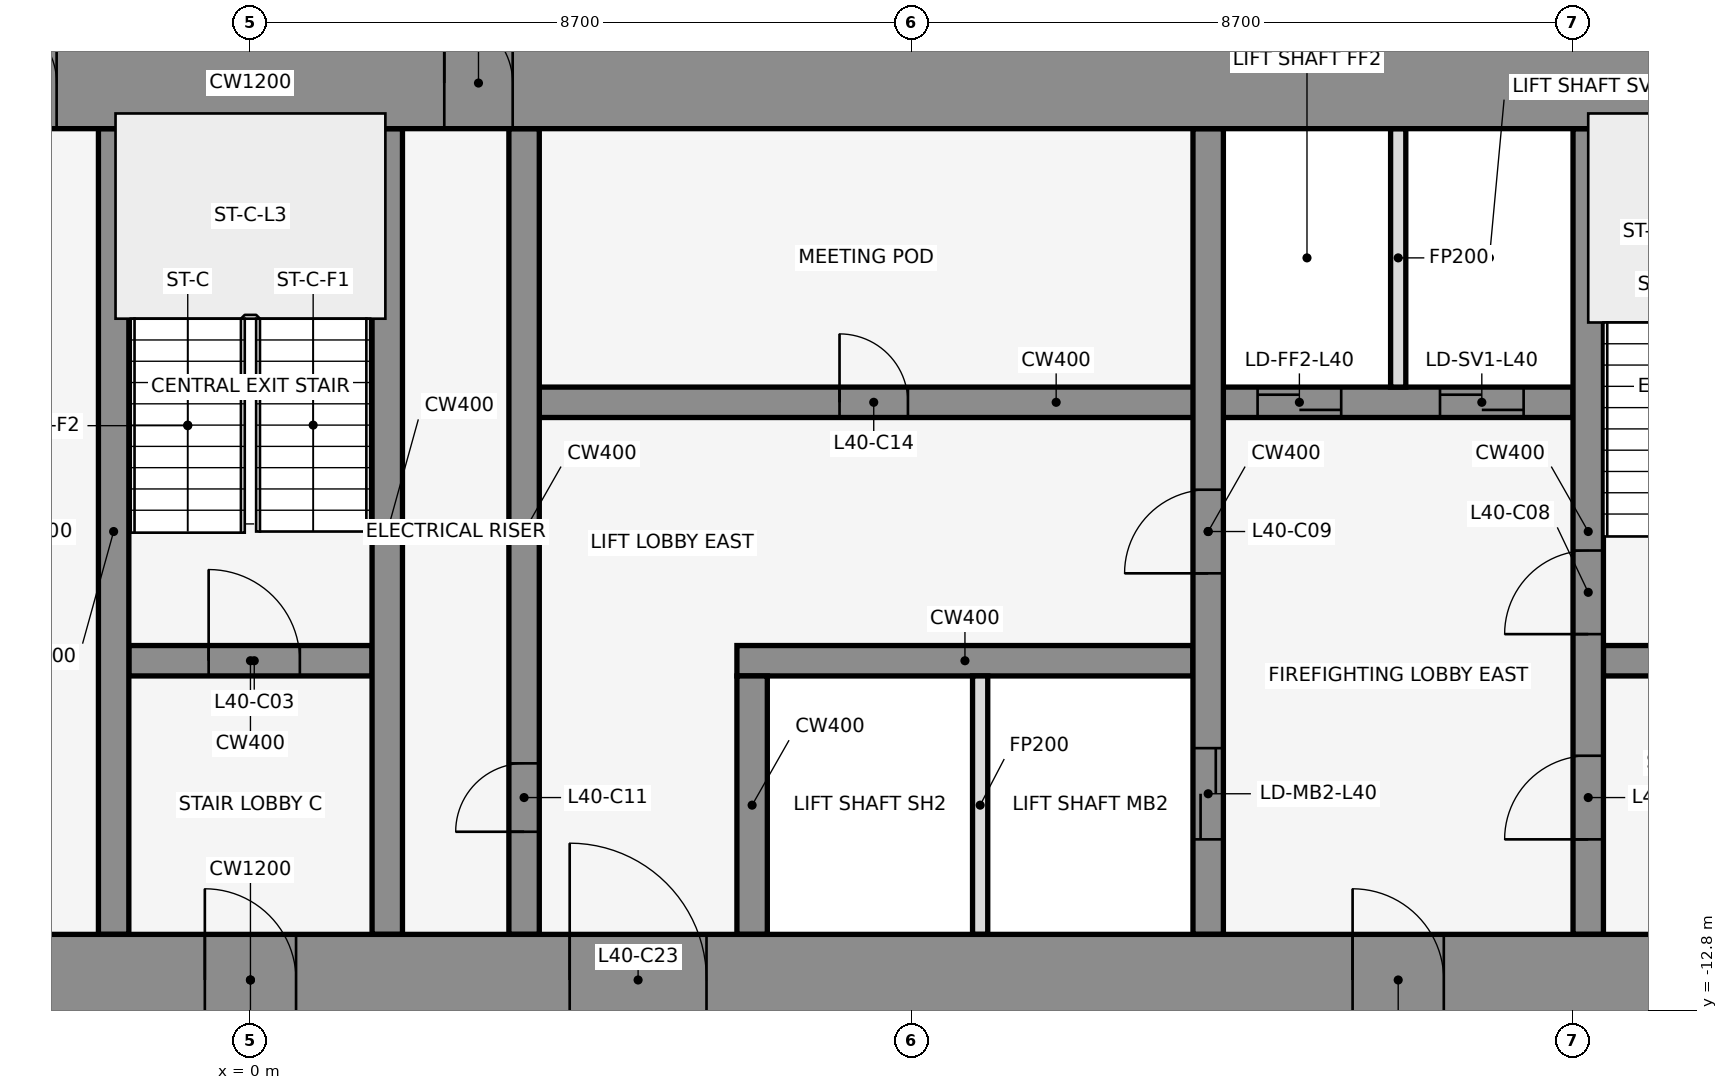
"""IFC4 building model, lengths in metres.
Left out: names, types, materials, properties, quantities, classifications, styles, units other than length and angle.
Written with IfcOpenShell. Run it as: python <this file> out.ifc"""

import sys

from ifc_helpers import new_model, si_unit, direction, frame, frame_2d, origin, place, context, subcontext, project, spatial, rectangle, extrude, element, fill, save


model = new_model("IFC4")
c1 = context("Model", 3, precision=1e-05, world=origin(), true_north=direction((0.0, 1.0)))
c2 = subcontext(c1, "Body", "Model", "MODEL_VIEW")
j1 = project(units=[si_unit("LENGTHUNIT", "METRE"), si_unit("PLANEANGLEUNIT", "RADIAN")], contexts=[c1])
p1 = place(None, origin())
s1 = spatial("IfcSite", under=j1, at=p1, CompositionType="ELEMENT")
p2 = place(p1, origin())
s2 = spatial("IfcBuilding", under=s1, at=p2, CompositionType="ELEMENT")
p3 = place(p2, frame((0.0, 0.0, 181.4)))
s3 = spatial("IfcBuildingStorey", under=s2, at=p3, CompositionType="ELEMENT", Elevation=181.4)
for number, where, z_axis, x_axis in (
    (1, (16.432, -0.105, 0.0), (0.0, 0.0, 1.0), (-0.84, 0.543, 0.0)),
    (2, (1.901, 1.08, 0.0), (0.0, 0.0, 1.0), (-0.84, -0.543, 0.0)),
    (3, (-0.068, -0.105, 0.0), (0.0, 0.0, 1.0), (-0.84, 0.543, 0.0)),
):
    element("IfcWall", number, at=place(p3, frame(where, z_axis=z_axis, x_axis=x_axis)), inside=s3, PredefinedType="STANDARD", context=c2, shape_type="SweptSolid", body=[
        extrude(rectangle(XDim=2.183, YDim=0.25, at=frame_2d((1.091, 0.0))), origin(), (0.0, 0.0, 1.0), 3.9),
    ])
p4 = place(p3, frame((-1.6, -8.2, 0.0), z_axis=(0.0, 0.0, 1.0), x_axis=(1.0, 0.0, 0.0)))
e4 = element("IfcWall", 4, at=p4, inside=s3, PredefinedType="SHEAR", context=c2, shape_type="SweptSolid", body=[
    extrude(rectangle(XDim=3.2, YDim=0.4, at=frame_2d((1.6, 0.0))), origin(), (0.0, 0.0, 1.0), 4.1),
])
p5 = place(p4, frame((1.05, 0.0, 0.0)))
e5 = element("IfcOpeningElement", 5, at=p5, cuts=e4, PredefinedType="OPENING", context=c2, shape_type="SweptSolid", body=[
    extrude(rectangle(XDim=1.2, YDim=2.1, at=frame_2d((0.6, 1.05))), frame((0.0, 0.212, 0.0), z_axis=(0.0, -1.0, 0.0), x_axis=(1.0, 0.0, 0.0)), (0.0, 0.0, 1.0), 0.424),
])
p6 = place(p3, frame((6.4, -8.2, 0.0), z_axis=(0.0, 0.0, 1.0), x_axis=(1.0, 0.0, 0.0)))
e6 = element("IfcWall", 6, at=p6, inside=s3, PredefinedType="SHEAR", context=c2, shape_type="SweptSolid", body=[
    extrude(rectangle(XDim=6.0, YDim=0.4, at=frame_2d((3.0, 0.0))), origin(), (0.0, 0.0, 1.0), 4.1),
])
p7 = place(p3, frame((17.8, -8.2, 0.0), z_axis=(0.0, 0.0, 1.0), x_axis=(1.0, 0.0, 0.0)))
e7 = element("IfcWall", 7, at=p7, inside=s3, PredefinedType="SHEAR", context=c2, shape_type="SweptSolid", body=[
    extrude(rectangle(XDim=3.0, YDim=0.4, at=frame_2d((1.5, 0.0))), origin(), (0.0, 0.0, 1.0), 4.1),
])
p8 = place(p7, frame((0.85, 0.0, 0.0)))
e8 = element("IfcOpeningElement", 8, at=p8, cuts=e7, PredefinedType="OPENING", context=c2, shape_type="SweptSolid", body=[
    extrude(rectangle(XDim=1.2, YDim=2.1, at=frame_2d((0.6, 1.05))), frame((0.0, 0.212, 0.0), z_axis=(0.0, -1.0, 0.0), x_axis=(1.0, 0.0, 0.0)), (0.0, 0.0, 1.0), 0.424),
])
p9 = place(p3, frame((3.8, -4.8, 0.0), z_axis=(0.0, 0.0, 1.0), x_axis=(1.0, 0.0, 0.0)))
e9 = element("IfcWall", 9, at=p9, inside=s3, PredefinedType="SHEAR", context=c2, shape_type="SweptSolid", body=[
    extrude(rectangle(XDim=13.6, YDim=0.4, at=frame_2d((6.8, 0.0))), origin(), (0.0, 0.0, 1.0), 4.1),
])
p10 = place(p9, frame((9.45, 0.0, 0.0)))
e10 = element("IfcOpeningElement", 10, at=p10, cuts=e9, PredefinedType="OPENING", context=c2, shape_type="SweptSolid", body=[
    extrude(rectangle(XDim=1.1, YDim=2.1, at=frame_2d((0.55, 1.05))), frame((0.0, 0.212, 0.0), z_axis=(0.0, -1.0, 0.0), x_axis=(1.0, 0.0, 0.0)), (0.0, 0.0, 1.0), 0.424),
])
p11 = place(p9, frame((11.85, 0.0, 0.0)))
e11 = element("IfcOpeningElement", 11, at=p11, cuts=e9, PredefinedType="OPENING", context=c2, shape_type="SweptSolid", body=[
    extrude(rectangle(XDim=1.1, YDim=2.1, at=frame_2d((0.55, 1.05))), frame((0.0, 0.212, 0.0), z_axis=(0.0, -1.0, 0.0), x_axis=(1.0, 0.0, 0.0)), (0.0, 0.0, 1.0), 0.424),
])
p12 = place(p9, frame((3.95, 0.0, 0.0)))
e12 = element("IfcOpeningElement", 12, at=p12, cuts=e9, PredefinedType="OPENING", context=c2, shape_type="SweptSolid", body=[
    extrude(rectangle(XDim=0.9, YDim=2.1, at=frame_2d((0.45, 1.05))), frame((0.0, 0.212, 0.0), z_axis=(0.0, -1.0, 0.0), x_axis=(1.0, 0.0, 0.0)), (0.0, 0.0, 1.0), 0.424),
])
for number, where, z_axis, x_axis in (
    (13, (-1.8, -11.8, 0.0), (0.0, 0.0, 1.0), (0.0, 1.0, 0.0)),
    (14, (1.8, -11.8, 0.0), (0.0, 0.0, 1.0), (0.0, 1.0, 0.0)),
):
    element("IfcWall", number, at=place(p3, frame(where, z_axis=z_axis, x_axis=x_axis)), inside=s3, PredefinedType="SHEAR", context=c2, shape_type="SweptSolid", body=[
        extrude(rectangle(XDim=10.6, YDim=0.4, at=frame_2d((5.3, 0.0))), origin(), (0.0, 0.0, 1.0), 4.1),
    ])
p13 = place(p3, frame((3.6, -11.8, 0.0), z_axis=(0.0, 0.0, 1.0), x_axis=(0.0, 1.0, 0.0)))
e15 = element("IfcWall", 15, at=p13, inside=s3, PredefinedType="SHEAR", context=c2, shape_type="SweptSolid", body=[
    extrude(rectangle(XDim=10.6, YDim=0.4, at=frame_2d((5.3, 0.0))), origin(), (0.0, 0.0, 1.0), 4.1),
])
p14 = place(p13, frame((1.35, 0.0, 0.0)))
e16 = element("IfcOpeningElement", 16, at=p14, cuts=e15, PredefinedType="OPENING", context=c2, shape_type="SweptSolid", body=[
    extrude(rectangle(XDim=0.9, YDim=2.1, at=frame_2d((0.45, 1.05))), frame((0.0, 0.212, 0.0), z_axis=(0.0, -1.0, 0.0), x_axis=(1.0, 0.0, 0.0)), (0.0, 0.0, 1.0), 0.424),
])
p15 = place(p3, frame((6.6, -11.8, 0.0), z_axis=(0.0, 0.0, 1.0), x_axis=(0.0, 1.0, 0.0)))
e17 = element("IfcWall", 17, at=p15, inside=s3, PredefinedType="SHEAR", context=c2, shape_type="SweptSolid", body=[
    extrude(rectangle(XDim=3.4, YDim=0.4, at=frame_2d((1.7, 0.0))), origin(), (0.0, 0.0, 1.0), 4.1),
])
p16 = place(p3, frame((9.6, -11.8, 0.0), z_axis=(0.0, 0.0, 1.0), x_axis=(0.0, 1.0, 0.0)))
e18 = element("IfcWall", 18, at=p16, inside=s3, PredefinedType="PARTITIONING", context=c2, shape_type="SweptSolid", body=[
    extrude(rectangle(XDim=3.4, YDim=0.2, at=frame_2d((1.7, 0.0))), origin(), (0.0, 0.0, 1.0), 2.79),
])
p17 = place(p3, frame((12.6, -11.8, 0.0), z_axis=(0.0, 0.0, 1.0), x_axis=(0.0, 1.0, 0.0)))
e19 = element("IfcWall", 19, at=p17, inside=s3, PredefinedType="SHEAR", context=c2, shape_type="SweptSolid", body=[
    extrude(rectangle(XDim=10.6, YDim=0.4, at=frame_2d((5.3, 0.0))), origin(), (0.0, 0.0, 1.0), 4.1),
])
p18 = place(p17, frame((1.25, 0.0, 0.0)))
e20 = element("IfcOpeningElement", 20, at=p18, cuts=e19, PredefinedType="OPENING", context=c2, shape_type="SweptSolid", body=[
    extrude(rectangle(XDim=1.2, YDim=2.1, at=frame_2d((0.6, 1.05))), frame((0.0, 0.212, 0.0), z_axis=(0.0, -1.0, 0.0), x_axis=(1.0, 0.0, 0.0)), (0.0, 0.0, 1.0), 0.424),
])
p19 = place(p17, frame((4.75, 0.0, 0.0)))
e21 = element("IfcOpeningElement", 21, at=p19, cuts=e19, PredefinedType="OPENING", context=c2, shape_type="SweptSolid", body=[
    extrude(rectangle(XDim=1.1, YDim=2.1, at=frame_2d((0.55, 1.05))), frame((0.0, 0.212, 0.0), z_axis=(0.0, -1.0, 0.0), x_axis=(1.0, 0.0, 0.0)), (0.0, 0.0, 1.0), 0.424),
])
p20 = place(p3, frame((15.1, -4.6, 0.0), z_axis=(0.0, 0.0, 1.0), x_axis=(0.0, 1.0, 0.0)))
e22 = element("IfcWall", 22, at=p20, inside=s3, PredefinedType="PARTITIONING", context=c2, shape_type="SweptSolid", body=[
    extrude(rectangle(XDim=3.4, YDim=0.2, at=frame_2d((1.7, 0.0))), origin(), (0.0, 0.0, 1.0), 2.79),
])
p21 = place(p3, frame((17.6, -11.8, 0.0), z_axis=(0.0, 0.0, 1.0), x_axis=(0.0, 1.0, 0.0)))
e23 = element("IfcWall", 23, at=p21, inside=s3, PredefinedType="SHEAR", context=c2, shape_type="SweptSolid", body=[
    extrude(rectangle(XDim=10.6, YDim=0.4, at=frame_2d((5.3, 0.0))), origin(), (0.0, 0.0, 1.0), 4.1),
])
p22 = place(p21, frame((1.25, 0.0, 0.0)))
e24 = element("IfcOpeningElement", 24, at=p22, cuts=e23, PredefinedType="OPENING", context=c2, shape_type="SweptSolid", body=[
    extrude(rectangle(XDim=1.1, YDim=2.1, at=frame_2d((0.55, 1.05))), frame((0.0, 0.212, 0.0), z_axis=(0.0, -1.0, 0.0), x_axis=(1.0, 0.0, 0.0)), (0.0, 0.0, 1.0), 0.424),
])
p23 = place(p21, frame((3.95, 0.0, 0.0)))
e25 = element("IfcOpeningElement", 25, at=p23, cuts=e23, PredefinedType="OPENING", context=c2, shape_type="SweptSolid", body=[
    extrude(rectangle(XDim=1.1, YDim=2.1, at=frame_2d((0.55, 1.05))), frame((0.0, 0.212, 0.0), z_axis=(0.0, -1.0, 0.0), x_axis=(1.0, 0.0, 0.0)), (0.0, 0.0, 1.0), 0.424),
])
p24 = place(p3, frame((-22.0, -0.6, 0.0), z_axis=(0.0, 0.0, 1.0), x_axis=(1.0, 0.0, 0.0)))
e26 = element("IfcWall", 26, at=p24, inside=s3, PredefinedType="SHEAR", context=c2, shape_type="SweptSolid", body=[
    extrude(rectangle(XDim=44.0, YDim=1.2, at=frame_2d((22.0, 0.0))), origin(), (0.0, 0.0, 1.0), 4.1),
])
p25 = place(p24, frame((18.55, 0.0, 0.0)))
e27 = element("IfcOpeningElement", 27, at=p25, cuts=e26, PredefinedType="OPENING", context=c2, shape_type="SweptSolid", body=[
    extrude(rectangle(XDim=0.9, YDim=2.1, at=frame_2d((0.45, 1.05))), frame((0.0, 0.612, 0.0), z_axis=(0.0, -1.0, 0.0), x_axis=(1.0, 0.0, 0.0)), (0.0, 0.0, 1.0), 1.224),
])
p26 = place(p24, frame((24.55, 0.0, 0.0)))
e28 = element("IfcOpeningElement", 28, at=p26, cuts=e26, PredefinedType="OPENING", context=c2, shape_type="SweptSolid", body=[
    extrude(rectangle(XDim=0.9, YDim=2.1, at=frame_2d((0.45, 1.05))), frame((0.0, 0.612, 0.0), z_axis=(0.0, -1.0, 0.0), x_axis=(1.0, 0.0, 0.0)), (0.0, 0.0, 1.0), 1.224),
])
p27 = place(p3, frame((-22.0, -12.4, 0.0), z_axis=(0.0, 0.0, 1.0), x_axis=(1.0, 0.0, 0.0)))
e29 = element("IfcWall", 29, at=p27, inside=s3, PredefinedType="SHEAR", context=c2, shape_type="SweptSolid", body=[
    extrude(rectangle(XDim=44.0, YDim=1.2, at=frame_2d((22.0, 0.0))), origin(), (0.0, 0.0, 1.0), 4.1),
])
p28 = place(p27, frame((2.2, 0.0, 0.0)))
e30 = element("IfcOpeningElement", 30, at=p28, cuts=e29, PredefinedType="OPENING", context=c2, shape_type="SweptSolid", body=[
    extrude(rectangle(XDim=1.2, YDim=2.1, at=frame_2d((0.6, 1.05))), frame((0.0, 0.612, 0.0), z_axis=(0.0, -1.0, 0.0), x_axis=(1.0, 0.0, 0.0)), (0.0, 0.0, 1.0), 1.224),
])
p29 = place(p27, frame((21.4, 0.0, 0.0)))
e31 = element("IfcOpeningElement", 31, at=p29, cuts=e29, PredefinedType="OPENING", context=c2, shape_type="SweptSolid", body=[
    extrude(rectangle(XDim=1.2, YDim=2.1, at=frame_2d((0.6, 1.05))), frame((0.0, 0.612, 0.0), z_axis=(0.0, -1.0, 0.0), x_axis=(1.0, 0.0, 0.0)), (0.0, 0.0, 1.0), 1.224),
])
p30 = place(p27, frame((40.6, 0.0, 0.0)))
e32 = element("IfcOpeningElement", 32, at=p30, cuts=e29, PredefinedType="OPENING", context=c2, shape_type="SweptSolid", body=[
    extrude(rectangle(XDim=1.2, YDim=2.1, at=frame_2d((0.6, 1.05))), frame((0.0, 0.612, 0.0), z_axis=(0.0, -1.0, 0.0), x_axis=(1.0, 0.0, 0.0)), (0.0, 0.0, 1.0), 1.224),
])
p31 = place(p27, frame((16.0, 0.0, 0.0)))
e33 = element("IfcOpeningElement", 33, at=p31, cuts=e29, PredefinedType="OPENING", context=c2, shape_type="SweptSolid", body=[
    extrude(rectangle(XDim=1.8, YDim=2.1, at=frame_2d((0.9, 1.05))), frame((0.0, 0.612, 0.0), z_axis=(0.0, -1.0, 0.0), x_axis=(1.0, 0.0, 0.0)), (0.0, 0.0, 1.0), 1.224),
])
p32 = place(p27, frame((6.3, 0.0, 0.0)))
e34 = element("IfcOpeningElement", 34, at=p32, cuts=e29, PredefinedType="OPENING", context=c2, shape_type="SweptSolid", body=[
    extrude(rectangle(XDim=1.2, YDim=2.1, at=frame_2d((0.6, 1.05))), frame((0.0, 0.612, 0.0), z_axis=(0.0, -1.0, 0.0), x_axis=(1.0, 0.0, 0.0)), (0.0, 0.0, 1.0), 1.224),
])
p33 = place(p27, frame((26.2, 0.0, 0.0)))
e35 = element("IfcOpeningElement", 35, at=p33, cuts=e29, PredefinedType="OPENING", context=c2, shape_type="SweptSolid", body=[
    extrude(rectangle(XDim=1.8, YDim=2.1, at=frame_2d((0.9, 1.05))), frame((0.0, 0.612, 0.0), z_axis=(0.0, -1.0, 0.0), x_axis=(1.0, 0.0, 0.0)), (0.0, 0.0, 1.0), 1.224),
])
p34 = place(p27, frame((36.5, 0.0, 0.0)))
e36 = element("IfcOpeningElement", 36, at=p34, cuts=e29, PredefinedType="OPENING", context=c2, shape_type="SweptSolid", body=[
    extrude(rectangle(XDim=1.2, YDim=2.1, at=frame_2d((0.6, 1.05))), frame((0.0, 0.612, 0.0), z_axis=(0.0, -1.0, 0.0), x_axis=(1.0, 0.0, 0.0)), (0.0, 0.0, 1.0), 1.224),
])
p35 = place(p5, origin())
e37 = element("IfcDoor", 37, at=p35, inside=s3, OperationType="SINGLE_SWING_LEFT", PredefinedType="DOOR", context=c2, shape_type="SweptSolid", body=[
    extrude(rectangle(XDim=1.2, YDim=2.1, at=frame_2d((0.6, 1.05))), frame((0.0, 0.025, 0.0), z_axis=(0.0, -1.0, 0.0), x_axis=(1.0, 0.0, 0.0)), (0.0, 0.0, 1.0), 0.05),
])
fill(e5, e37)
p36 = place(p22, origin())
e38 = element("IfcDoor", 38, at=p36, inside=s3, OperationType="SINGLE_SWING_LEFT", PredefinedType="DOOR", context=c2, shape_type="SweptSolid", body=[
    extrude(rectangle(XDim=1.1, YDim=2.1, at=frame_2d((0.55, 1.05))), frame((0.0, 0.025, 0.0), z_axis=(0.0, -1.0, 0.0), x_axis=(1.0, 0.0, 0.0)), (0.0, 0.0, 1.0), 0.05),
])
fill(e24, e38)
p37 = place(p18, origin())
e39 = element("IfcDoor", 39, at=p37, inside=s3, OperationType="DOUBLE_DOOR_SLIDING", PredefinedType="DOOR", context=c2, shape_type="SweptSolid", body=[
    extrude(rectangle(XDim=1.2, YDim=2.1, at=frame_2d((0.6, 1.05))), frame((0.0, 0.025, 0.0), z_axis=(0.0, -1.0, 0.0), x_axis=(1.0, 0.0, 0.0)), (0.0, 0.0, 1.0), 0.05),
])
fill(e20, e39)
p38 = place(p10, origin())
e40 = element("IfcDoor", 40, at=p38, inside=s3, OperationType="DOUBLE_DOOR_SLIDING", PredefinedType="DOOR", context=c2, shape_type="SweptSolid", body=[
    extrude(rectangle(XDim=1.1, YDim=2.1, at=frame_2d((0.55, 1.05))), frame((0.0, 0.025, 0.0), z_axis=(0.0, -1.0, 0.0), x_axis=(1.0, 0.0, 0.0)), (0.0, 0.0, 1.0), 0.05),
])
fill(e10, e40)
p39 = place(p11, origin())
e41 = element("IfcDoor", 41, at=p39, inside=s3, OperationType="DOUBLE_DOOR_SLIDING", PredefinedType="DOOR", context=c2, shape_type="SweptSolid", body=[
    extrude(rectangle(XDim=1.1, YDim=2.1, at=frame_2d((0.55, 1.05))), frame((0.0, 0.025, 0.0), z_axis=(0.0, -1.0, 0.0), x_axis=(1.0, 0.0, 0.0)), (0.0, 0.0, 1.0), 0.05),
])
fill(e11, e41)
p40 = place(p23, origin())
e42 = element("IfcDoor", 42, at=p40, inside=s3, OperationType="SINGLE_SWING_RIGHT", PredefinedType="DOOR", context=c2, shape_type="SweptSolid", body=[
    extrude(rectangle(XDim=1.1, YDim=2.1, at=frame_2d((0.55, 1.05))), frame((0.0, 0.025, 0.0), z_axis=(0.0, -1.0, 0.0), x_axis=(1.0, 0.0, 0.0)), (0.0, 0.0, 1.0), 0.05),
])
fill(e25, e42)
p41 = place(p19, frame((1.1, 0.0, 0.0), z_axis=(0.0, 0.0, 1.0), x_axis=(-1.0, 0.0, 0.0)))
e43 = element("IfcDoor", 43, at=p41, inside=s3, OperationType="SINGLE_SWING_RIGHT", PredefinedType="DOOR", context=c2, shape_type="SweptSolid", body=[
    extrude(rectangle(XDim=1.1, YDim=2.1, at=frame_2d((0.55, 1.05))), frame((0.0, 0.025, 0.0), z_axis=(0.0, -1.0, 0.0), x_axis=(1.0, 0.0, 0.0)), (0.0, 0.0, 1.0), 0.05),
])
fill(e21, e43)
p42 = place(p14, origin())
e44 = element("IfcDoor", 44, at=p42, inside=s3, OperationType="SINGLE_SWING_LEFT", PredefinedType="DOOR", context=c2, shape_type="SweptSolid", body=[
    extrude(rectangle(XDim=0.9, YDim=2.1, at=frame_2d((0.45, 1.05))), frame((0.0, 0.025, 0.0), z_axis=(0.0, -1.0, 0.0), x_axis=(1.0, 0.0, 0.0)), (0.0, 0.0, 1.0), 0.05),
])
fill(e16, e44)
p43 = place(p12, origin())
e45 = element("IfcDoor", 45, at=p43, inside=s3, OperationType="SINGLE_SWING_RIGHT", PredefinedType="DOOR", context=c2, shape_type="SweptSolid", body=[
    extrude(rectangle(XDim=0.9, YDim=2.1, at=frame_2d((0.45, 1.05))), frame((0.0, 0.025, 0.0), z_axis=(0.0, -1.0, 0.0), x_axis=(1.0, 0.0, 0.0)), (0.0, 0.0, 1.0), 0.05),
])
fill(e12, e45)
p44 = place(p25, origin())
e46 = element("IfcDoor", 46, at=p44, inside=s3, OperationType="SINGLE_SWING_LEFT", PredefinedType="DOOR", context=c2, shape_type="SweptSolid", body=[
    extrude(rectangle(XDim=0.9, YDim=2.1, at=frame_2d((0.45, 1.05))), frame((0.0, 0.025, 0.0), z_axis=(0.0, -1.0, 0.0), x_axis=(1.0, 0.0, 0.0)), (0.0, 0.0, 1.0), 0.05),
])
fill(e27, e46)
p45 = place(p26, origin())
e47 = element("IfcDoor", 47, at=p45, inside=s3, OperationType="SINGLE_SWING_LEFT", PredefinedType="DOOR", context=c2, shape_type="SweptSolid", body=[
    extrude(rectangle(XDim=0.9, YDim=2.1, at=frame_2d((0.45, 1.05))), frame((0.0, 0.025, 0.0), z_axis=(0.0, -1.0, 0.0), x_axis=(1.0, 0.0, 0.0)), (0.0, 0.0, 1.0), 0.05),
])
fill(e28, e47)
p46 = place(p29, frame((1.2, 0.0, 0.0), z_axis=(0.0, 0.0, 1.0), x_axis=(-1.0, 0.0, 0.0)))
e48 = element("IfcDoor", 48, at=p46, inside=s3, OperationType="SINGLE_SWING_RIGHT", PredefinedType="DOOR", context=c2, shape_type="SweptSolid", body=[
    extrude(rectangle(XDim=1.2, YDim=2.1, at=frame_2d((0.6, 1.05))), frame((0.0, 0.025, 0.0), z_axis=(0.0, -1.0, 0.0), x_axis=(1.0, 0.0, 0.0)), (0.0, 0.0, 1.0), 0.05),
])
fill(e31, e48)
p47 = place(p33, origin())
e49 = element("IfcDoor", 49, at=p47, inside=s3, OperationType="SINGLE_SWING_LEFT", PredefinedType="DOOR", context=c2, shape_type="SweptSolid", body=[
    extrude(rectangle(XDim=1.8, YDim=2.1, at=frame_2d((0.9, 1.05))), frame((0.0, 0.025, 0.0), z_axis=(0.0, -1.0, 0.0), x_axis=(1.0, 0.0, 0.0)), (0.0, 0.0, 1.0), 0.05),
])
fill(e35, e49)
p48 = place(p34, frame((1.2, 0.0, 0.0), z_axis=(0.0, 0.0, 1.0), x_axis=(-1.0, 0.0, 0.0)))
e50 = element("IfcDoor", 50, at=p48, inside=s3, OperationType="SINGLE_SWING_RIGHT", PredefinedType="DOOR", context=c2, shape_type="SweptSolid", body=[
    extrude(rectangle(XDim=1.2, YDim=2.1, at=frame_2d((0.6, 1.05))), frame((0.0, 0.025, 0.0), z_axis=(0.0, -1.0, 0.0), x_axis=(1.0, 0.0, 0.0)), (0.0, 0.0, 1.0), 0.05),
])
fill(e36, e50)
save(model, sys.argv[1])
